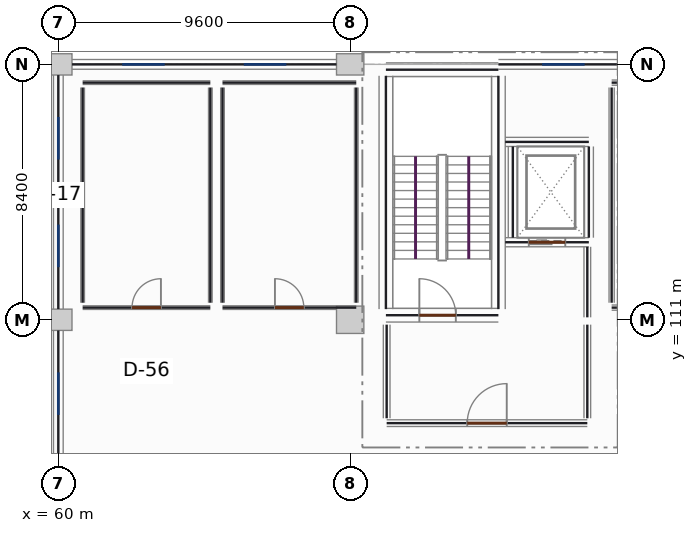
"""IFC4 building model, lengths in metres.
Left out: names, types, materials, properties, quantities, classifications, styles, units other than length and angle.
Written with IfcOpenShell. Run it as: python <this file> out.ifc"""

import sys

from ifc_helpers import new_model, si_unit, direction, frame, frame_2d, origin, origin_2d, place, context, subcontext, project, spatial, rectangle, extrude, element, fill, save


model = new_model("IFC4")
c1 = context("Model", 3, precision=1e-05, world=origin(), true_north=direction((0.0, 1.0)))
c2 = subcontext(c1, "Body", "Model", "MODEL_VIEW")
j1 = project(units=[si_unit("LENGTHUNIT", "METRE"), si_unit("PLANEANGLEUNIT", "RADIAN")], contexts=[c1])
p1 = place(None, origin())
s1 = spatial("IfcSite", under=j1, at=p1, CompositionType="ELEMENT")
p2 = place(p1, origin())
s2 = spatial("IfcBuilding", under=s1, at=p2, CompositionType="ELEMENT")
p3 = place(p2, frame((0.0, 0.0, 5.4)))
s3 = spatial("IfcBuildingStorey", under=s2, at=p3, CompositionType="ELEMENT", Elevation=5.4)
for number, where, z_axis, x_axis in (
    (1, (60.0, 111.0, 0.0), (0.0, 0.0, 1.0), (1.0, 0.0, 0.0)),
    (2, (60.0, 119.4, 0.0), (0.0, 0.0, 1.0), (1.0, 0.0, 0.0)),
):
    element("IfcColumn", number, at=place(p3, frame(where, z_axis=z_axis, x_axis=x_axis)), inside=s3, PredefinedType="COLUMN", context=c2, shape_type="SweptSolid", body=[
        extrude(rectangle(XDim=0.9, YDim=0.7, at=origin_2d()), origin(), (0.0, 0.0, 1.0), 4.18),
    ])
p4 = place(p3, frame((69.6, 111.0, 0.0), z_axis=(0.0, 0.0, 1.0), x_axis=(1.0, 0.0, 0.0)))
e3 = element("IfcColumn", 3, at=p4, inside=s3, PredefinedType="COLUMN", context=c2, shape_type="SweptSolid", body=[
    extrude(rectangle(XDim=0.9, YDim=0.9, at=origin_2d()), origin(), (0.0, 0.0, 1.0), 4.18),
])
p5 = place(p3, frame((69.6, 119.4, 0.0), z_axis=(0.0, 0.0, 1.0), x_axis=(1.0, 0.0, 0.0)))
e4 = element("IfcColumn", 4, at=p5, inside=s3, PredefinedType="COLUMN", context=c2, shape_type="SweptSolid", body=[
    extrude(rectangle(XDim=0.9, YDim=0.7, at=origin_2d()), origin(), (0.0, 0.0, 1.0), 4.18),
])
p6 = place(p3, frame((60.0, 102.952, 0.0), z_axis=(0.0, 0.0, 1.0), x_axis=(0.0, 1.0, 0.0)))
e5 = element("IfcWall", 5, at=p6, inside=s3, PredefinedType="SOLIDWALL", context=c2, shape_type="SweptSolid", body=[
    extrude(rectangle(XDim=7.696, YDim=0.32, at=frame_2d((3.848, 0.0))), origin(), (0.0, 0.0, 1.0), 3.38),
])
p7 = place(p6, frame((1.378, 0.0, 0.85)))
e6 = element("IfcOpeningElement", 6, at=p7, cuts=e5, PredefinedType="OPENING", context=c2, shape_type="SweptSolid", body=[
    extrude(rectangle(XDim=1.4, YDim=1.65, at=frame_2d((0.7, 0.825))), frame((0.0, 0.17, 0.0), z_axis=(0.0, -1.0, 0.0), x_axis=(1.0, 0.0, 0.0)), (0.0, 0.0, 1.0), 0.34),
])
p8 = place(p6, frame((4.918, 0.0, 0.85)))
e7 = element("IfcOpeningElement", 7, at=p8, cuts=e5, PredefinedType="OPENING", context=c2, shape_type="SweptSolid", body=[
    extrude(rectangle(XDim=1.4, YDim=1.65, at=frame_2d((0.7, 0.825))), frame((0.0, 0.17, 0.0), z_axis=(0.0, -1.0, 0.0), x_axis=(1.0, 0.0, 0.0)), (0.0, 0.0, 1.0), 0.34),
])
p9 = place(p3, frame((60.0, 111.352, 0.0), z_axis=(0.0, 0.0, 1.0), x_axis=(0.0, 1.0, 0.0)))
e8 = element("IfcWall", 8, at=p9, inside=s3, PredefinedType="SOLIDWALL", context=c2, shape_type="SweptSolid", body=[
    extrude(rectangle(XDim=7.696, YDim=0.32, at=frame_2d((3.848, 0.0))), origin(), (0.0, 0.0, 1.0), 3.38),
])
p10 = place(p9, frame((1.378, 0.0, 0.85)))
e9 = element("IfcOpeningElement", 9, at=p10, cuts=e8, PredefinedType="OPENING", context=c2, shape_type="SweptSolid", body=[
    extrude(rectangle(XDim=1.4, YDim=1.65, at=frame_2d((0.7, 0.825))), frame((0.0, 0.17, 0.0), z_axis=(0.0, -1.0, 0.0), x_axis=(1.0, 0.0, 0.0)), (0.0, 0.0, 1.0), 0.34),
])
p11 = place(p9, frame((4.918, 0.0, 0.85)))
e10 = element("IfcOpeningElement", 10, at=p11, cuts=e8, PredefinedType="OPENING", context=c2, shape_type="SweptSolid", body=[
    extrude(rectangle(XDim=1.4, YDim=1.65, at=frame_2d((0.7, 0.825))), frame((0.0, 0.17, 0.0), z_axis=(0.0, -1.0, 0.0), x_axis=(1.0, 0.0, 0.0)), (0.0, 0.0, 1.0), 0.34),
])
p12 = place(p3, frame((60.452, 119.4, 0.0), z_axis=(0.0, 0.0, 1.0), x_axis=(1.0, 0.0, 0.0)))
e11 = element("IfcWall", 11, at=p12, inside=s3, PredefinedType="SOLIDWALL", context=c2, shape_type="SweptSolid", body=[
    extrude(rectangle(XDim=8.696, YDim=0.32, at=frame_2d((4.348, 0.0))), origin(), (0.0, 0.0, 1.0), 3.38),
])
p13 = place(p12, frame((1.648, 0.0, 0.85)))
e12 = element("IfcOpeningElement", 12, at=p13, cuts=e11, PredefinedType="OPENING", context=c2, shape_type="SweptSolid", body=[
    extrude(rectangle(XDim=1.4, YDim=1.65, at=frame_2d((0.7, 0.825))), frame((0.0, 0.17, 0.0), z_axis=(0.0, -1.0, 0.0), x_axis=(1.0, 0.0, 0.0)), (0.0, 0.0, 1.0), 0.34),
])
p14 = place(p12, frame((5.648, 0.0, 0.85)))
e13 = element("IfcOpeningElement", 13, at=p14, cuts=e11, PredefinedType="OPENING", context=c2, shape_type="SweptSolid", body=[
    extrude(rectangle(XDim=1.4, YDim=1.65, at=frame_2d((0.7, 0.825))), frame((0.0, 0.17, 0.0), z_axis=(0.0, -1.0, 0.0), x_axis=(1.0, 0.0, 0.0)), (0.0, 0.0, 1.0), 0.34),
])
p15 = place(p3, frame((74.476, 119.4, 0.0), z_axis=(0.0, 0.0, 1.0), x_axis=(1.0, 0.0, 0.0)))
e14 = element("IfcWall", 14, at=p15, inside=s3, PredefinedType="SOLIDWALL", context=c2, shape_type="SweptSolid", body=[
    extrude(rectangle(XDim=4.272, YDim=0.32, at=frame_2d((2.136, 0.0))), origin(), (0.0, 0.0, 1.0), 3.38),
])
p16 = place(p15, frame((1.436, 0.0, 0.9)))
e15 = element("IfcOpeningElement", 15, at=p16, cuts=e14, PredefinedType="OPENING", context=c2, shape_type="SweptSolid", body=[
    extrude(rectangle(XDim=1.4, YDim=1.65, at=frame_2d((0.7, 0.825))), frame((0.0, 0.17, 0.0), z_axis=(0.0, -1.0, 0.0), x_axis=(1.0, 0.0, 0.0)), (0.0, 0.0, 1.0), 0.34),
])
p17 = place(p3, frame((70.775, 111.15, 0.0), z_axis=(0.0, 0.0, 1.0), x_axis=(1.0, 0.0, 0.0)))
e16 = element("IfcWall", 16, at=p17, inside=s3, PredefinedType="SHEAR", context=c2, shape_type="SweptSolid", body=[
    extrude(rectangle(XDim=3.7, YDim=0.45, at=frame_2d((1.85, 0.0))), origin(), (0.0, 0.0, 1.0), 4.18),
])
p18 = place(p17, frame((1.1, 0.0, 0.0)))
e17 = element("IfcOpeningElement", 17, at=p18, cuts=e16, PredefinedType="OPENING", context=c2, shape_type="SweptSolid", body=[
    extrude(rectangle(XDim=1.2, YDim=2.2, at=frame_2d((0.6, 1.1))), frame((0.0, 0.235, 0.0), z_axis=(0.0, -1.0, 0.0), x_axis=(1.0, 0.0, 0.0)), (0.0, 0.0, 1.0), 0.47),
])
for number, where, z_axis, x_axis in (
    (18, (70.775, 111.35, 0.0), (0.0, 0.0, 1.0), (0.0, 1.0, 0.0)),
    (19, (74.475, 111.35, 0.0), (0.0, 0.0, 1.0), (0.0, 1.0, 0.0)),
):
    element("IfcWall", number, at=place(p3, frame(where, z_axis=z_axis, x_axis=x_axis)), inside=s3, PredefinedType="SHEAR", context=c2, shape_type="SweptSolid", body=[
        extrude(rectangle(XDim=7.675, YDim=0.45, at=frame_2d((3.837, 0.0))), origin(), (0.0, 0.0, 1.0), 4.18),
    ])
p19 = place(p3, frame((70.775, 119.225, 0.0), z_axis=(0.0, 0.0, 1.0), x_axis=(1.0, 0.0, 0.0)))
e20 = element("IfcWall", 20, at=p19, inside=s3, PredefinedType="SHEAR", context=c2, shape_type="SweptSolid", body=[
    extrude(rectangle(XDim=3.7, YDim=0.45, at=frame_2d((1.85, 0.0))), origin(), (0.0, 0.0, 1.0), 4.18),
])
p20 = place(p3, frame((74.7, 113.55, 0.0), z_axis=(0.0, 0.0, 1.0), x_axis=(1.0, 0.0, 0.0)))
e21 = element("IfcWall", 21, at=p20, inside=s3, PredefinedType="SHEAR", context=c2, shape_type="SweptSolid", body=[
    extrude(rectangle(XDim=2.75, YDim=0.3, at=frame_2d((1.375, 0.0))), origin(), (0.0, 0.0, 1.0), 4.18),
])
p21 = place(p20, frame((0.775, 0.0, 0.0)))
e22 = element("IfcOpeningElement", 22, at=p21, cuts=e21, PredefinedType="OPENING", context=c2, shape_type="SweptSolid", body=[
    extrude(rectangle(XDim=1.2, YDim=2.2, at=frame_2d((0.6, 1.1))), frame((0.0, 0.16, 0.0), z_axis=(0.0, -1.0, 0.0), x_axis=(1.0, 0.0, 0.0)), (0.0, 0.0, 1.0), 0.32),
])
p22 = place(p3, frame((74.7, 116.85, 0.0), z_axis=(0.0, 0.0, 1.0), x_axis=(1.0, 0.0, 0.0)))
e23 = element("IfcWall", 23, at=p22, inside=s3, PredefinedType="SHEAR", context=c2, shape_type="SweptSolid", body=[
    extrude(rectangle(XDim=2.75, YDim=0.3, at=frame_2d((1.375, 0.0))), origin(), (0.0, 0.0, 1.0), 4.18),
])
for number, where, z_axis, x_axis in (
    (24, (74.95, 113.7, 0.0), (0.0, 0.0, 1.0), (0.0, 1.0, 0.0)),
    (25, (77.45, 113.7, 0.0), (0.0, 0.0, 1.0), (0.0, 1.0, 0.0)),
):
    element("IfcWall", number, at=place(p3, frame(where, z_axis=z_axis, x_axis=x_axis)), inside=s3, PredefinedType="SHEAR", context=c2, shape_type="SweptSolid", body=[
        extrude(rectangle(XDim=3.0, YDim=0.3, at=frame_2d((1.5, 0.0))), origin(), (0.0, 0.0, 1.0), 4.18),
    ])
p23 = place(p3, frame((70.8, 107.6, 0.0), z_axis=(0.0, 0.0, 1.0), x_axis=(1.0, 0.0, 0.0)))
e26 = element("IfcWall", 26, at=p23, inside=s3, PredefinedType="PARTITIONING", context=c2, shape_type="SweptSolid", body=[
    extrude(rectangle(XDim=6.6, YDim=0.22, at=frame_2d((3.3, 0.0))), origin(), (0.0, 0.0, 1.0), 3.22),
])
p24 = place(p23, frame((2.65, 0.0, 0.0)))
e27 = element("IfcOpeningElement", 27, at=p24, cuts=e26, PredefinedType="OPENING", context=c2, shape_type="SweptSolid", body=[
    extrude(rectangle(XDim=1.3, YDim=2.2, at=frame_2d((0.65, 1.1))), frame((0.0, 0.12, 0.0), z_axis=(0.0, -1.0, 0.0), x_axis=(1.0, 0.0, 0.0)), (0.0, 0.0, 1.0), 0.24),
])
p25 = place(p3, frame((77.4, 111.08, 0.0), z_axis=(0.0, 0.0, 1.0), x_axis=(0.0, 1.0, 0.0)))
e28 = element("IfcWall", 28, at=p25, inside=s3, PredefinedType="PARTITIONING", context=c2, shape_type="SweptSolid", body=[
    extrude(rectangle(XDim=2.32, YDim=0.22, at=frame_2d((1.16, 0.0))), origin(), (0.0, 0.0, 1.0), 3.22),
])
for number, where, z_axis, x_axis in (
    (29, (70.8, 107.76, 0.0), (0.0, 0.0, 1.0), (0.0, 1.0, 0.0)),
    (30, (77.4, 107.76, 0.0), (0.0, 0.0, 1.0), (0.0, 1.0, 0.0)),
):
    element("IfcWall", number, at=place(p3, frame(where, z_axis=z_axis, x_axis=x_axis)), inside=s3, PredefinedType="PARTITIONING", context=c2, shape_type="SweptSolid", body=[
        extrude(rectangle(XDim=3.08, YDim=0.22, at=frame_2d((1.54, 0.0))), origin(), (0.0, 0.0, 1.0), 3.22),
    ])
p26 = place(p3, frame((78.2, 111.4, 0.0), z_axis=(0.0, 0.0, 1.0), x_axis=(1.0, 0.0, 0.0)))
e31 = element("IfcWall", 31, at=p26, inside=s3, PredefinedType="PARTITIONING", context=c2, shape_type="SweptSolid", body=[
    extrude(rectangle(XDim=21.4, YDim=0.17, at=frame_2d((10.7, 0.0))), origin(), (0.0, 0.0, 1.0), 3.22),
])
p27 = place(p26, frame((6.94, 0.0, 0.0)))
e32 = element("IfcOpeningElement", 32, at=p27, cuts=e31, PredefinedType="OPENING", context=c2, shape_type="SweptSolid", body=[
    extrude(rectangle(XDim=1.1, YDim=2.2, at=frame_2d((0.55, 1.1))), frame((0.0, 0.095, 0.0), z_axis=(0.0, -1.0, 0.0), x_axis=(1.0, 0.0, 0.0)), (0.0, 0.0, 1.0), 0.19),
])
p28 = place(p3, frame((78.2, 118.8, 0.0), z_axis=(0.0, 0.0, 1.0), x_axis=(1.0, 0.0, 0.0)))
e33 = element("IfcWall", 33, at=p28, inside=s3, PredefinedType="PARTITIONING", context=c2, shape_type="SweptSolid", body=[
    extrude(rectangle(XDim=21.4, YDim=0.17, at=frame_2d((10.7, 0.0))), origin(), (0.0, 0.0, 1.0), 3.22),
])
p29 = place(p3, frame((78.2, 111.56, 0.0), z_axis=(0.0, 0.0, 1.0), x_axis=(0.0, 1.0, 0.0)))
e34 = element("IfcWall", 34, at=p29, inside=s3, PredefinedType="PARTITIONING", context=c2, shape_type="SweptSolid", body=[
    extrude(rectangle(XDim=7.08, YDim=0.17, at=frame_2d((3.54, 0.0))), origin(), (0.0, 0.0, 1.0), 3.22),
])
p30 = place(p3, frame((60.8, 111.4, 0.0), z_axis=(0.0, 0.0, 1.0), x_axis=(1.0, 0.0, 0.0)))
e35 = element("IfcWall", 35, at=p30, inside=s3, PredefinedType="PARTITIONING", context=c2, shape_type="SweptSolid", body=[
    extrude(rectangle(XDim=4.2, YDim=0.12, at=frame_2d((2.1, 0.0))), origin(), (0.0, 0.0, 1.0), 3.22),
])
p31 = place(p30, frame((1.625, 0.0, 0.0)))
e36 = element("IfcOpeningElement", 36, at=p31, cuts=e35, PredefinedType="OPENING", context=c2, shape_type="SweptSolid", body=[
    extrude(rectangle(XDim=0.95, YDim=2.1, at=frame_2d((0.475, 1.05))), frame((0.0, 0.07, 0.0), z_axis=(0.0, -1.0, 0.0), x_axis=(1.0, 0.0, 0.0)), (0.0, 0.0, 1.0), 0.14),
])
p32 = place(p3, frame((60.8, 118.8, 0.0), z_axis=(0.0, 0.0, 1.0), x_axis=(1.0, 0.0, 0.0)))
e37 = element("IfcWall", 37, at=p32, inside=s3, PredefinedType="PARTITIONING", context=c2, shape_type="SweptSolid", body=[
    extrude(rectangle(XDim=4.2, YDim=0.12, at=frame_2d((2.1, 0.0))), origin(), (0.0, 0.0, 1.0), 3.22),
])
for number, where, z_axis, x_axis in (
    (38, (60.8, 111.56, 0.0), (0.0, 0.0, 1.0), (0.0, 1.0, 0.0)),
    (39, (65.0, 111.56, 0.0), (0.0, 0.0, 1.0), (0.0, 1.0, 0.0)),
):
    element("IfcWall", number, at=place(p3, frame(where, z_axis=z_axis, x_axis=x_axis)), inside=s3, PredefinedType="PARTITIONING", context=c2, shape_type="SweptSolid", body=[
        extrude(rectangle(XDim=7.08, YDim=0.12, at=frame_2d((3.54, 0.0))), origin(), (0.0, 0.0, 1.0), 3.22),
    ])
p33 = place(p3, frame((65.4, 111.4, 0.0), z_axis=(0.0, 0.0, 1.0), x_axis=(1.0, 0.0, 0.0)))
e40 = element("IfcWall", 40, at=p33, inside=s3, PredefinedType="PARTITIONING", context=c2, shape_type="SweptSolid", body=[
    extrude(rectangle(XDim=4.4, YDim=0.12, at=frame_2d((2.2, 0.0))), origin(), (0.0, 0.0, 1.0), 3.22),
])
p34 = place(p33, frame((1.725, 0.0, 0.0)))
e41 = element("IfcOpeningElement", 41, at=p34, cuts=e40, PredefinedType="OPENING", context=c2, shape_type="SweptSolid", body=[
    extrude(rectangle(XDim=0.95, YDim=2.1, at=frame_2d((0.475, 1.05))), frame((0.0, 0.07, 0.0), z_axis=(0.0, -1.0, 0.0), x_axis=(1.0, 0.0, 0.0)), (0.0, 0.0, 1.0), 0.14),
])
p35 = place(p3, frame((65.4, 118.8, 0.0), z_axis=(0.0, 0.0, 1.0), x_axis=(1.0, 0.0, 0.0)))
e42 = element("IfcWall", 42, at=p35, inside=s3, PredefinedType="PARTITIONING", context=c2, shape_type="SweptSolid", body=[
    extrude(rectangle(XDim=4.4, YDim=0.12, at=frame_2d((2.2, 0.0))), origin(), (0.0, 0.0, 1.0), 3.22),
])
for number, where, z_axis, x_axis in (
    (43, (65.4, 111.56, 0.0), (0.0, 0.0, 1.0), (0.0, 1.0, 0.0)),
    (44, (69.8, 111.56, 0.0), (0.0, 0.0, 1.0), (0.0, 1.0, 0.0)),
):
    element("IfcWall", number, at=place(p3, frame(where, z_axis=z_axis, x_axis=x_axis)), inside=s3, PredefinedType="PARTITIONING", context=c2, shape_type="SweptSolid", body=[
        extrude(rectangle(XDim=7.08, YDim=0.12, at=frame_2d((3.54, 0.0))), origin(), (0.0, 0.0, 1.0), 3.22),
    ])
p36 = place(p8, origin())
e45 = element("IfcWindow", 45, at=p36, inside=s3, PartitioningType="SINGLE_PANEL", PredefinedType="WINDOW", context=c2, shape_type="SweptSolid", body=[
    extrude(rectangle(XDim=1.4, YDim=1.65, at=frame_2d((0.7, 0.825))), frame((0.0, 0.03, 0.0), z_axis=(0.0, -1.0, 0.0), x_axis=(1.0, 0.0, 0.0)), (0.0, 0.0, 1.0), 0.06),
])
fill(e7, e45)
p37 = place(p10, origin())
e46 = element("IfcWindow", 46, at=p37, inside=s3, PartitioningType="SINGLE_PANEL", PredefinedType="WINDOW", context=c2, shape_type="SweptSolid", body=[
    extrude(rectangle(XDim=1.4, YDim=1.65, at=frame_2d((0.7, 0.825))), frame((0.0, 0.03, 0.0), z_axis=(0.0, -1.0, 0.0), x_axis=(1.0, 0.0, 0.0)), (0.0, 0.0, 1.0), 0.06),
])
fill(e9, e46)
p38 = place(p11, origin())
e47 = element("IfcWindow", 47, at=p38, inside=s3, PartitioningType="SINGLE_PANEL", PredefinedType="WINDOW", context=c2, shape_type="SweptSolid", body=[
    extrude(rectangle(XDim=1.4, YDim=1.65, at=frame_2d((0.7, 0.825))), frame((0.0, 0.03, 0.0), z_axis=(0.0, -1.0, 0.0), x_axis=(1.0, 0.0, 0.0)), (0.0, 0.0, 1.0), 0.06),
])
fill(e10, e47)
p39 = place(p13, origin())
e48 = element("IfcWindow", 48, at=p39, inside=s3, PartitioningType="SINGLE_PANEL", PredefinedType="WINDOW", context=c2, shape_type="SweptSolid", body=[
    extrude(rectangle(XDim=1.4, YDim=1.65, at=frame_2d((0.7, 0.825))), frame((0.0, 0.03, 0.0), z_axis=(0.0, -1.0, 0.0), x_axis=(1.0, 0.0, 0.0)), (0.0, 0.0, 1.0), 0.06),
])
fill(e12, e48)
p40 = place(p14, origin())
e49 = element("IfcWindow", 49, at=p40, inside=s3, PartitioningType="SINGLE_PANEL", PredefinedType="WINDOW", context=c2, shape_type="SweptSolid", body=[
    extrude(rectangle(XDim=1.4, YDim=1.65, at=frame_2d((0.7, 0.825))), frame((0.0, 0.03, 0.0), z_axis=(0.0, -1.0, 0.0), x_axis=(1.0, 0.0, 0.0)), (0.0, 0.0, 1.0), 0.06),
])
fill(e13, e49)
p41 = place(p16, origin())
e50 = element("IfcWindow", 50, at=p41, inside=s3, PartitioningType="SINGLE_PANEL", PredefinedType="WINDOW", context=c2, shape_type="SweptSolid", body=[
    extrude(rectangle(XDim=1.4, YDim=1.65, at=frame_2d((0.7, 0.825))), frame((0.0, 0.03, 0.0), z_axis=(0.0, -1.0, 0.0), x_axis=(1.0, 0.0, 0.0)), (0.0, 0.0, 1.0), 0.06),
])
fill(e15, e50)
p42 = place(p18, origin())
e51 = element("IfcDoor", 51, at=p42, inside=s3, OperationType="SINGLE_SWING_LEFT", PredefinedType="DOOR", context=c2, shape_type="SweptSolid", body=[
    extrude(rectangle(XDim=1.2, YDim=2.2, at=frame_2d((0.6, 1.1))), frame((0.0, 0.025, 0.0), z_axis=(0.0, -1.0, 0.0), x_axis=(1.0, 0.0, 0.0)), (0.0, 0.0, 1.0), 0.05),
])
fill(e17, e51)
p43 = place(p21, origin())
e52 = element("IfcDoor", 52, at=p43, inside=s3, OperationType="SLIDING_TO_LEFT", PredefinedType="DOOR", context=c2, shape_type="SweptSolid", body=[
    extrude(rectangle(XDim=1.2, YDim=2.2, at=frame_2d((0.6, 1.1))), frame((0.0, 0.025, 0.0), z_axis=(0.0, -1.0, 0.0), x_axis=(1.0, 0.0, 0.0)), (0.0, 0.0, 1.0), 0.05),
])
fill(e22, e52)
p44 = place(p24, origin())
e53 = element("IfcDoor", 53, at=p44, inside=s3, OperationType="SINGLE_SWING_RIGHT", PredefinedType="DOOR", context=c2, shape_type="SweptSolid", body=[
    extrude(rectangle(XDim=1.3, YDim=2.2, at=frame_2d((0.65, 1.1))), frame((0.0, 0.025, 0.0), z_axis=(0.0, -1.0, 0.0), x_axis=(1.0, 0.0, 0.0)), (0.0, 0.0, 1.0), 0.05),
])
fill(e27, e53)
p45 = place(p31, origin())
e54 = element("IfcDoor", 54, at=p45, inside=s3, OperationType="SINGLE_SWING_RIGHT", PredefinedType="DOOR", context=c2, shape_type="SweptSolid", body=[
    extrude(rectangle(XDim=0.95, YDim=2.1, at=frame_2d((0.475, 1.05))), frame((0.0, 0.025, 0.0), z_axis=(0.0, -1.0, 0.0), x_axis=(1.0, 0.0, 0.0)), (0.0, 0.0, 1.0), 0.05),
])
fill(e36, e54)
p46 = place(p34, origin())
e55 = element("IfcDoor", 55, at=p46, inside=s3, OperationType="SINGLE_SWING_LEFT", PredefinedType="DOOR", context=c2, shape_type="SweptSolid", body=[
    extrude(rectangle(XDim=0.95, YDim=2.1, at=frame_2d((0.475, 1.05))), frame((0.0, 0.025, 0.0), z_axis=(0.0, -1.0, 0.0), x_axis=(1.0, 0.0, 0.0)), (0.0, 0.0, 1.0), 0.05),
])
fill(e41, e55)
save(model, sys.argv[1])
